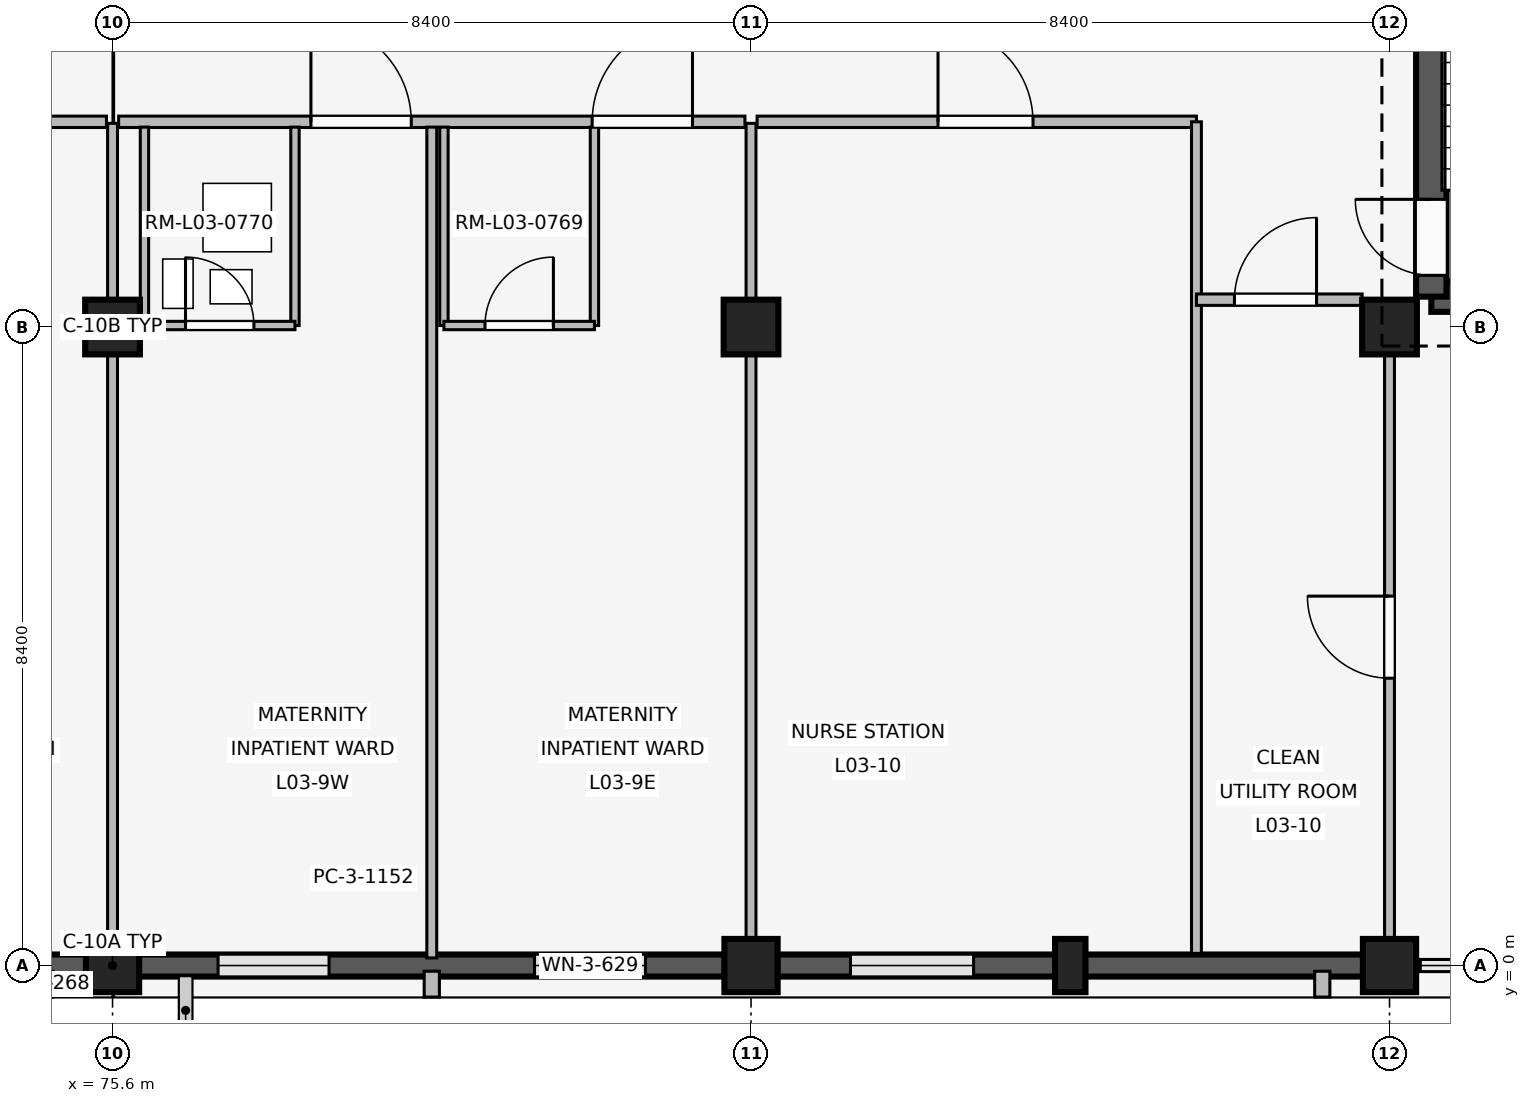
"""IFC4 building model, lengths in metres.
Left out: names, types, materials, properties, quantities, classifications, styles, units other than length and angle.
Written with IfcOpenShell. Run it as: python <this file> out.ifc"""

import sys

from ifc_helpers import new_model, si_unit, direction, frame, frame_2d, origin, origin_2d, place, context, subcontext, project, spatial, rectangle, extrude, element, fill, save


model = new_model("IFC4")
c1 = context("Model", 3, precision=1e-05, world=origin(), true_north=direction((0.0, 1.0)))
c2 = subcontext(c1, "Body", "Model", "MODEL_VIEW")
j1 = project(units=[si_unit("LENGTHUNIT", "METRE"), si_unit("PLANEANGLEUNIT", "RADIAN")], contexts=[c1])
p1 = place(None, origin())
s1 = spatial("IfcSite", under=j1, at=p1, CompositionType="ELEMENT")
p2 = place(p1, origin())
s2 = spatial("IfcBuilding", under=s1, at=p2, CompositionType="ELEMENT")
p3 = place(p2, frame((0.0, 0.0, 12.9)))
s3 = spatial("IfcBuildingStorey", under=s2, at=p3, CompositionType="ELEMENT", Elevation=12.9)
p4 = place(p3, frame((75.6, 0.0, 0.0), z_axis=(0.0, 0.0, 1.0), x_axis=(1.0, 0.0, 0.0)))
e1 = element("IfcColumn", 1, at=p4, inside=s3, PredefinedType="COLUMN", context=c2, shape_type="SweptSolid", body=[
    extrude(rectangle(XDim=0.7, YDim=0.7, at=origin_2d()), origin(), (0.0, 0.0, 1.0), 3.3),
])
p5 = place(p3, frame((75.6, 8.4, 0.0), z_axis=(0.0, 0.0, 1.0), x_axis=(1.0, 0.0, 0.0)))
e2 = element("IfcColumn", 2, at=p5, inside=s3, PredefinedType="COLUMN", context=c2, shape_type="SweptSolid", body=[
    extrude(rectangle(XDim=0.72, YDim=0.72, at=origin_2d()), origin(), (0.0, 0.0, 1.0), 3.3),
])
p6 = place(p3, frame((84.0, 0.0, 0.0), z_axis=(0.0, 0.0, 1.0), x_axis=(1.0, 0.0, 0.0)))
e3 = element("IfcColumn", 3, at=p6, inside=s3, PredefinedType="COLUMN", context=c2, shape_type="SweptSolid", body=[
    extrude(rectangle(XDim=0.7, YDim=0.7, at=origin_2d()), origin(), (0.0, 0.0, 1.0), 3.3),
])
p7 = place(p3, frame((84.0, 8.4, 0.0), z_axis=(0.0, 0.0, 1.0), x_axis=(1.0, 0.0, 0.0)))
e4 = element("IfcColumn", 4, at=p7, inside=s3, PredefinedType="COLUMN", context=c2, shape_type="SweptSolid", body=[
    extrude(rectangle(XDim=0.72, YDim=0.72, at=origin_2d()), origin(), (0.0, 0.0, 1.0), 3.3),
])
p8 = place(p3, frame((92.4, 0.0, 0.0), z_axis=(0.0, 0.0, 1.0), x_axis=(1.0, 0.0, 0.0)))
e5 = element("IfcColumn", 5, at=p8, inside=s3, PredefinedType="COLUMN", context=c2, shape_type="SweptSolid", body=[
    extrude(rectangle(XDim=0.7, YDim=0.7, at=origin_2d()), origin(), (0.0, 0.0, 1.0), 3.3),
])
p9 = place(p3, frame((92.4, 8.4, 0.0), z_axis=(0.0, 0.0, 1.0), x_axis=(1.0, 0.0, 0.0)))
e6 = element("IfcColumn", 6, at=p9, inside=s3, PredefinedType="COLUMN", context=c2, shape_type="SweptSolid", body=[
    extrude(rectangle(XDim=0.72, YDim=0.72, at=origin_2d()), origin(), (0.0, 0.0, 1.0), 3.3),
])
p10 = place(p3, frame((88.2, 0.0, 0.0), z_axis=(0.0, 0.0, 1.0), x_axis=(1.0, 0.0, 0.0)))
e7 = element("IfcColumn", 7, at=p10, inside=s3, PredefinedType="PILASTER", context=c2, shape_type="SweptSolid", body=[
    extrude(rectangle(XDim=0.4, YDim=0.7, at=origin_2d()), origin(), (0.0, 0.0, 1.0), 3.3),
])
p11 = place(p3, frame((75.255, 0.0, 0.0), z_axis=(0.0, 0.0, 1.0), x_axis=(-1.0, 0.0, 0.0)))
e8 = element("IfcWall", 8, at=p11, inside=s3, PredefinedType="SOLIDWALL", context=c2, shape_type="SweptSolid", body=[
    extrude(rectangle(XDim=7.71, YDim=0.29, at=frame_2d((3.855, 0.0))), origin(), (0.0, 0.0, 1.0), 2.44),
])
p12 = place(p11, frame((0.963, 0.0, 0.85)))
e9 = element("IfcOpeningElement", 9, at=p12, cuts=e8, PredefinedType="OPENING", context=c2, shape_type="SweptSolid", body=[
    extrude(rectangle(XDim=1.62, YDim=0.95, at=frame_2d((0.81, 0.475))), frame((0.0, 0.155, 0.0), z_axis=(0.0, -1.0, 0.0), x_axis=(1.0, 0.0, 0.0)), (0.0, 0.0, 1.0), 0.31),
])
p13 = place(p11, frame((5.127, 0.0, 0.85)))
e10 = element("IfcOpeningElement", 10, at=p13, cuts=e8, PredefinedType="OPENING", context=c2, shape_type="SweptSolid", body=[
    extrude(rectangle(XDim=1.62, YDim=0.95, at=frame_2d((0.81, 0.475))), frame((0.0, 0.155, 0.0), z_axis=(0.0, -1.0, 0.0), x_axis=(1.0, 0.0, 0.0)), (0.0, 0.0, 1.0), 0.31),
])
p14 = place(p3, frame((74.715, -0.075, 0.0), z_axis=(0.0, 0.0, 1.0), x_axis=(0.0, -1.0, 0.0)))
e11 = element("IfcWall", 11, at=p14, inside=s3, PredefinedType="ELEMENTEDWALL", context=c2, shape_type="SweptSolid", body=[
    extrude(rectangle(XDim=0.34, YDim=0.2, at=frame_2d((0.17, 0.0))), origin(), (0.0, 0.0, 1.0), 2.42),
])
p15 = place(p3, frame((83.655, 0.0, 0.0), z_axis=(0.0, 0.0, 1.0), x_axis=(-1.0, 0.0, 0.0)))
e12 = element("IfcWall", 12, at=p15, inside=s3, PredefinedType="SOLIDWALL", context=c2, shape_type="SweptSolid", body=[
    extrude(rectangle(XDim=7.71, YDim=0.29, at=frame_2d((3.855, 0.0))), origin(), (0.0, 0.0, 1.0), 2.44),
])
p16 = place(p15, frame((1.043, 0.0, 0.85)))
e13 = element("IfcOpeningElement", 13, at=p16, cuts=e12, PredefinedType="OPENING", context=c2, shape_type="SweptSolid", body=[
    extrude(rectangle(XDim=1.46, YDim=0.85, at=frame_2d((0.73, 0.425))), frame((0.0, 0.155, 0.0), z_axis=(0.0, -1.0, 0.0), x_axis=(1.0, 0.0, 0.0)), (0.0, 0.0, 1.0), 0.31),
])
p17 = place(p15, frame((5.207, 0.0, 0.85)))
e14 = element("IfcOpeningElement", 14, at=p17, cuts=e12, PredefinedType="OPENING", context=c2, shape_type="SweptSolid", body=[
    extrude(rectangle(XDim=1.46, YDim=0.85, at=frame_2d((0.73, 0.425))), frame((0.0, 0.155, 0.0), z_axis=(0.0, -1.0, 0.0), x_axis=(1.0, 0.0, 0.0)), (0.0, 0.0, 1.0), 0.31),
])
p18 = place(p3, frame((79.8, -0.075, 0.0), z_axis=(0.0, 0.0, 1.0), x_axis=(0.0, -1.0, 0.0)))
e15 = element("IfcWall", 15, at=p18, inside=s3, PredefinedType="ELEMENTEDWALL", context=c2, shape_type="SweptSolid", body=[
    extrude(rectangle(XDim=0.34, YDim=0.2, at=frame_2d((0.17, 0.0))), origin(), (0.0, 0.0, 1.0), 2.42),
])
p19 = place(p3, frame((92.055, 0.0, 0.0), z_axis=(0.0, 0.0, 1.0), x_axis=(-1.0, 0.0, 0.0)))
e16 = element("IfcWall", 16, at=p19, inside=s3, PredefinedType="SOLIDWALL", context=c2, shape_type="SweptSolid", body=[
    extrude(rectangle(XDim=7.71, YDim=0.29, at=frame_2d((3.855, 0.0))), origin(), (0.0, 0.0, 1.0), 2.44),
])
p20 = place(p19, frame((5.127, 0.0, 0.85)))
e17 = element("IfcOpeningElement", 17, at=p20, cuts=e16, PredefinedType="OPENING", context=c2, shape_type="SweptSolid", body=[
    extrude(rectangle(XDim=1.62, YDim=0.95, at=frame_2d((0.81, 0.475))), frame((0.0, 0.155, 0.0), z_axis=(0.0, -1.0, 0.0), x_axis=(1.0, 0.0, 0.0)), (0.0, 0.0, 1.0), 0.31),
])
p21 = place(p3, frame((91.515, -0.075, 0.0), z_axis=(0.0, 0.0, 1.0), x_axis=(0.0, -1.0, 0.0)))
e18 = element("IfcWall", 18, at=p21, inside=s3, PredefinedType="ELEMENTEDWALL", context=c2, shape_type="SweptSolid", body=[
    extrude(rectangle(XDim=0.34, YDim=0.2, at=frame_2d((0.17, 0.0))), origin(), (0.0, 0.0, 1.0), 2.42),
])
p22 = place(p3, frame((92.95, 8.8, 0.0), z_axis=(0.0, 0.0, 1.0), x_axis=(1.0, 0.0, 0.0)))
e19 = element("IfcWall", 19, at=p22, inside=s3, PredefinedType="SHEAR", context=c2, shape_type="SweptSolid", body=[
    extrude(rectangle(XDim=7.5, YDim=0.4, at=frame_2d((3.75, 0.0))), origin(), (0.0, 0.0, 1.0), 3.02),
])
p23 = place(p22, frame((4.85, 0.0, 0.0)))
e20 = element("IfcOpeningElement", 20, at=p23, cuts=e19, PredefinedType="OPENING", context=c2, shape_type="SweptSolid", body=[
    extrude(rectangle(XDim=1.2, YDim=2.2, at=frame_2d((0.6, 1.1))), frame((0.0, 0.21, 0.0), z_axis=(0.0, -1.0, 0.0), x_axis=(1.0, 0.0, 0.0)), (0.0, 0.0, 1.0), 0.42),
])
p24 = place(p3, frame((92.95, 8.8, 0.0), z_axis=(0.0, 0.0, 1.0), x_axis=(0.0, 1.0, 0.0)))
e21 = element("IfcWall", 21, at=p24, inside=s3, PredefinedType="SHEAR", context=c2, shape_type="SweptSolid", body=[
    extrude(rectangle(XDim=7.55, YDim=0.4, at=frame_2d((3.775, 0.0))), origin(), (0.0, 0.0, 1.0), 3.02),
])
p25 = place(p24, frame((0.28, 0.0, 0.0)))
e22 = element("IfcOpeningElement", 22, at=p25, cuts=e21, PredefinedType="OPENING", context=c2, shape_type="SweptSolid", body=[
    extrude(rectangle(XDim=1.0, YDim=2.15, at=frame_2d((0.5, 1.075))), frame((0.0, 0.21, 0.0), z_axis=(0.0, -1.0, 0.0), x_axis=(1.0, 0.0, 0.0)), (0.0, 0.0, 1.0), 0.42),
])
p26 = place(p3, frame((67.28, 11.1, 0.0), z_axis=(0.0, 0.0, 1.0), x_axis=(1.0, 0.0, 0.0)))
e23 = element("IfcWall", 23, at=p26, inside=s3, PredefinedType="PARTITIONING", context=c2, shape_type="SweptSolid", body=[
    extrude(rectangle(XDim=8.24, YDim=0.15, at=frame_2d((4.12, 0.0))), origin(), (0.0, 0.0, 1.0), 2.42),
])
p27 = place(p26, frame((2.53, 0.0, 0.0)))
e24 = element("IfcOpeningElement", 24, at=p27, cuts=e23, PredefinedType="OPENING", context=c2, shape_type="SweptSolid", body=[
    extrude(rectangle(XDim=1.25, YDim=2.2, at=frame_2d((0.625, 1.1))), frame((0.0, 0.085, 0.0), z_axis=(0.0, -1.0, 0.0), x_axis=(1.0, 0.0, 0.0)), (0.0, 0.0, 1.0), 0.17),
])
p28 = place(p26, frame((6.23, 0.0, 0.0)))
e25 = element("IfcOpeningElement", 25, at=p28, cuts=e23, PredefinedType="OPENING", context=c2, shape_type="SweptSolid", body=[
    extrude(rectangle(XDim=1.25, YDim=2.2, at=frame_2d((0.625, 1.1))), frame((0.0, 0.085, 0.0), z_axis=(0.0, -1.0, 0.0), x_axis=(1.0, 0.0, 0.0)), (0.0, 0.0, 1.0), 0.17),
])
p29 = place(p3, frame((75.6, 0.14, 0.0), z_axis=(0.0, 0.0, 1.0), x_axis=(0.0, 1.0, 0.0)))
e26 = element("IfcWall", 26, at=p29, inside=s3, PredefinedType="PARTITIONING", context=c2, shape_type="SweptSolid", body=[
    extrude(rectangle(XDim=10.94, YDim=0.13, at=frame_2d((5.47, 0.0))), origin(), (0.0, 0.0, 1.0), 2.42),
])
p30 = place(p3, frame((75.68, 11.1, 0.0), z_axis=(0.0, 0.0, 1.0), x_axis=(1.0, 0.0, 0.0)))
e27 = element("IfcWall", 27, at=p30, inside=s3, PredefinedType="PARTITIONING", context=c2, shape_type="SweptSolid", body=[
    extrude(rectangle(XDim=8.24, YDim=0.15, at=frame_2d((4.12, 0.0))), origin(), (0.0, 0.0, 1.0), 2.42),
])
p31 = place(p30, frame((2.53, 0.0, 0.0)))
e28 = element("IfcOpeningElement", 28, at=p31, cuts=e27, PredefinedType="OPENING", context=c2, shape_type="SweptSolid", body=[
    extrude(rectangle(XDim=1.32, YDim=2.25, at=frame_2d((0.66, 1.125))), frame((0.0, 0.085, 0.0), z_axis=(0.0, -1.0, 0.0), x_axis=(1.0, 0.0, 0.0)), (0.0, 0.0, 1.0), 0.17),
])
p32 = place(p30, frame((6.23, 0.0, 0.0)))
e29 = element("IfcOpeningElement", 29, at=p32, cuts=e27, PredefinedType="OPENING", context=c2, shape_type="SweptSolid", body=[
    extrude(rectangle(XDim=1.32, YDim=2.25, at=frame_2d((0.66, 1.125))), frame((0.0, 0.085, 0.0), z_axis=(0.0, -1.0, 0.0), x_axis=(1.0, 0.0, 0.0)), (0.0, 0.0, 1.0), 0.17),
])
p33 = place(p3, frame((79.8, 0.1, 0.0), z_axis=(0.0, 0.0, 1.0), x_axis=(0.0, 1.0, 0.0)))
e30 = element("IfcWall", 30, at=p33, inside=s3, PredefinedType="PARTITIONING", context=c2, shape_type="SweptSolid", body=[
    extrude(rectangle(XDim=10.93, YDim=0.13, at=frame_2d((5.465, 0.0))), origin(), (0.0, 0.0, 1.0), 2.42),
])
for number, where, z_axis, x_axis in (
    (31, (76.02, 8.42, 0.0), (0.0, 0.0, 1.0), (0.0, 1.0, 0.0)),
    (32, (78.0, 8.42, 0.0), (0.0, 0.0, 1.0), (0.0, 1.0, 0.0)),
):
    element("IfcWall", number, at=place(p3, frame(where, z_axis=z_axis, x_axis=x_axis)), inside=s3, PredefinedType="PARTITIONING", context=c2, shape_type="SweptSolid", body=[
        extrude(rectangle(XDim=2.61, YDim=0.11, at=frame_2d((1.305, 0.0))), origin(), (0.0, 0.0, 1.0), 2.42),
    ])
p34 = place(p3, frame((76.02, 8.42, 0.0), z_axis=(0.0, 0.0, 1.0), x_axis=(1.0, 0.0, 0.0)))
e33 = element("IfcWall", 33, at=p34, inside=s3, PredefinedType="PARTITIONING", context=c2, shape_type="SweptSolid", body=[
    extrude(rectangle(XDim=1.98, YDim=0.11, at=frame_2d((0.99, 0.0))), origin(), (0.0, 0.0, 1.0), 2.42),
])
p35 = place(p34, frame((0.54, 0.0, 0.0)))
e34 = element("IfcOpeningElement", 34, at=p35, cuts=e33, PredefinedType="OPENING", context=c2, shape_type="SweptSolid", body=[
    extrude(rectangle(XDim=0.9, YDim=2.1, at=frame_2d((0.45, 1.05))), frame((0.0, 0.065, 0.0), z_axis=(0.0, -1.0, 0.0), x_axis=(1.0, 0.0, 0.0)), (0.0, 0.0, 1.0), 0.13),
])
for number, where, z_axis, x_axis in (
    (35, (79.96, 8.42, 0.0), (0.0, 0.0, 1.0), (0.0, 1.0, 0.0)),
    (36, (81.94, 8.42, 0.0), (0.0, 0.0, 1.0), (0.0, 1.0, 0.0)),
):
    element("IfcWall", number, at=place(p3, frame(where, z_axis=z_axis, x_axis=x_axis)), inside=s3, PredefinedType="PARTITIONING", context=c2, shape_type="SweptSolid", body=[
        extrude(rectangle(XDim=2.61, YDim=0.11, at=frame_2d((1.305, 0.0))), origin(), (0.0, 0.0, 1.0), 2.42),
    ])
p36 = place(p3, frame((79.96, 8.42, 0.0), z_axis=(0.0, 0.0, 1.0), x_axis=(1.0, 0.0, 0.0)))
e37 = element("IfcWall", 37, at=p36, inside=s3, PredefinedType="PARTITIONING", context=c2, shape_type="SweptSolid", body=[
    extrude(rectangle(XDim=1.98, YDim=0.11, at=frame_2d((0.99, 0.0))), origin(), (0.0, 0.0, 1.0), 2.42),
])
p37 = place(p36, frame((0.54, 0.0, 0.0)))
e38 = element("IfcOpeningElement", 38, at=p37, cuts=e37, PredefinedType="OPENING", context=c2, shape_type="SweptSolid", body=[
    extrude(rectangle(XDim=0.9, YDim=2.1, at=frame_2d((0.45, 1.05))), frame((0.0, 0.065, 0.0), z_axis=(0.0, -1.0, 0.0), x_axis=(1.0, 0.0, 0.0)), (0.0, 0.0, 1.0), 0.13),
])
p38 = place(p3, frame((78.45, 1.15, 0.0), z_axis=(0.0, 0.0, 1.0), x_axis=(1.0, 0.0, 0.0)))
e39 = element("IfcWall", 39, at=p38, inside=s3, PredefinedType="PLUMBINGWALL", context=c2, shape_type="SweptSolid", body=[
    extrude(rectangle(XDim=0.9, YDim=0.24, at=frame_2d((0.45, 0.0))), origin(), (0.0, 0.0, 1.0), 2.42),
])
p39 = place(p3, frame((84.0, 0.14, 0.0), z_axis=(0.0, 0.0, 1.0), x_axis=(0.0, 1.0, 0.0)))
e40 = element("IfcWall", 40, at=p39, inside=s3, PredefinedType="PARTITIONING", context=c2, shape_type="SweptSolid", body=[
    extrude(rectangle(XDim=10.94, YDim=0.13, at=frame_2d((5.47, 0.0))), origin(), (0.0, 0.0, 1.0), 2.42),
])
p40 = place(p3, frame((84.08, 11.1, 0.0), z_axis=(0.0, 0.0, 1.0), x_axis=(1.0, 0.0, 0.0)))
e41 = element("IfcWall", 41, at=p40, inside=s3, PredefinedType="PARTITIONING", context=c2, shape_type="SweptSolid", body=[
    extrude(rectangle(XDim=5.78, YDim=0.15, at=frame_2d((2.89, 0.0))), origin(), (0.0, 0.0, 1.0), 2.42),
])
p41 = place(p40, frame((2.38, 0.0, 0.0)))
e42 = element("IfcOpeningElement", 42, at=p41, cuts=e41, PredefinedType="OPENING", context=c2, shape_type="SweptSolid", body=[
    extrude(rectangle(XDim=1.25, YDim=2.2, at=frame_2d((0.625, 1.1))), frame((0.0, 0.085, 0.0), z_axis=(0.0, -1.0, 0.0), x_axis=(1.0, 0.0, 0.0)), (0.0, 0.0, 1.0), 0.17),
])
p42 = place(p3, frame((89.86, 0.16, 0.0), z_axis=(0.0, 0.0, 1.0), x_axis=(0.0, 1.0, 0.0)))
e43 = element("IfcWall", 43, at=p42, inside=s3, PredefinedType="PARTITIONING", context=c2, shape_type="SweptSolid", body=[
    extrude(rectangle(XDim=10.94, YDim=0.13, at=frame_2d((5.47, 0.0))), origin(), (0.0, 0.0, 1.0), 2.42),
])
p43 = place(p3, frame((89.86, 8.76, 0.0), z_axis=(0.0, 0.0, 1.0), x_axis=(1.0, 0.0, 0.0)))
e44 = element("IfcWall", 44, at=p43, inside=s3, PredefinedType="PARTITIONING", context=c2, shape_type="SweptSolid", body=[
    extrude(rectangle(XDim=2.18, YDim=0.15, at=frame_2d((1.09, 0.0))), origin(), (0.0, 0.0, 1.0), 2.42),
])
p44 = place(p43, frame((0.5, 0.0, 0.0)))
e45 = element("IfcOpeningElement", 45, at=p44, cuts=e44, PredefinedType="OPENING", context=c2, shape_type="SweptSolid", body=[
    extrude(rectangle(XDim=1.08, YDim=2.15, at=frame_2d((0.54, 1.075))), frame((0.0, 0.085, 0.0), z_axis=(0.0, -1.0, 0.0), x_axis=(1.0, 0.0, 0.0)), (0.0, 0.0, 1.0), 0.17),
])
p45 = place(p3, frame((92.4, 0.14, 0.0), z_axis=(0.0, 0.0, 1.0), x_axis=(0.0, 1.0, 0.0)))
e46 = element("IfcWall", 46, at=p45, inside=s3, PredefinedType="PARTITIONING", context=c2, shape_type="SweptSolid", body=[
    extrude(rectangle(XDim=8.21, YDim=0.13, at=frame_2d((4.105, 0.0))), origin(), (0.0, 0.0, 1.0), 2.42),
])
p46 = place(p45, frame((3.64, 0.0, 0.0)))
e47 = element("IfcOpeningElement", 47, at=p46, cuts=e46, PredefinedType="OPENING", context=c2, shape_type="SweptSolid", body=[
    extrude(rectangle(XDim=1.08, YDim=2.15, at=frame_2d((0.54, 1.075))), frame((0.0, 0.075, 0.0), z_axis=(0.0, -1.0, 0.0), x_axis=(1.0, 0.0, 0.0)), (0.0, 0.0, 1.0), 0.15),
])
p47 = place(p16, origin())
e48 = element("IfcWindow", 48, at=p47, inside=s3, PartitioningType="SINGLE_PANEL", PredefinedType="WINDOW", context=c2, shape_type="SweptSolid", body=[
    extrude(rectangle(XDim=1.46, YDim=0.85, at=frame_2d((0.73, 0.425))), frame((0.0, 0.03, 0.0), z_axis=(0.0, -1.0, 0.0), x_axis=(1.0, 0.0, 0.0)), (0.0, 0.0, 1.0), 0.06),
])
fill(e13, e48)
p48 = place(p17, origin())
e49 = element("IfcWindow", 49, at=p48, inside=s3, PartitioningType="SINGLE_PANEL", PredefinedType="WINDOW", context=c2, shape_type="SweptSolid", body=[
    extrude(rectangle(XDim=1.46, YDim=0.85, at=frame_2d((0.73, 0.425))), frame((0.0, 0.03, 0.0), z_axis=(0.0, -1.0, 0.0), x_axis=(1.0, 0.0, 0.0)), (0.0, 0.0, 1.0), 0.06),
])
fill(e14, e49)
p49 = place(p20, origin())
e50 = element("IfcWindow", 50, at=p49, inside=s3, PartitioningType="SINGLE_PANEL", PredefinedType="WINDOW", context=c2, shape_type="SweptSolid", body=[
    extrude(rectangle(XDim=1.62, YDim=0.95, at=frame_2d((0.81, 0.475))), frame((0.0, 0.03, 0.0), z_axis=(0.0, -1.0, 0.0), x_axis=(1.0, 0.0, 0.0)), (0.0, 0.0, 1.0), 0.06),
])
fill(e17, e50)
p50 = place(p25, origin())
e51 = element("IfcDoor", 51, at=p50, inside=s3, OperationType="SINGLE_SWING_RIGHT", PredefinedType="DOOR", context=c2, shape_type="SweptSolid", body=[
    extrude(rectangle(XDim=1.0, YDim=2.15, at=frame_2d((0.5, 1.075))), frame((0.0, 0.025, 0.0), z_axis=(0.0, -1.0, 0.0), x_axis=(1.0, 0.0, 0.0)), (0.0, 0.0, 1.0), 0.05),
])
fill(e22, e51)
p51 = place(p31, origin())
e52 = element("IfcDoor", 52, at=p51, inside=s3, OperationType="SINGLE_SWING_LEFT", PredefinedType="DOOR", context=c2, shape_type="SweptSolid", body=[
    extrude(rectangle(XDim=1.32, YDim=2.25, at=frame_2d((0.66, 1.125))), frame((0.0, 0.025, 0.0), z_axis=(0.0, -1.0, 0.0), x_axis=(1.0, 0.0, 0.0)), (0.0, 0.0, 1.0), 0.05),
])
fill(e28, e52)
p52 = place(p32, origin())
e53 = element("IfcDoor", 53, at=p52, inside=s3, OperationType="SINGLE_SWING_RIGHT", PredefinedType="DOOR", context=c2, shape_type="SweptSolid", body=[
    extrude(rectangle(XDim=1.32, YDim=2.25, at=frame_2d((0.66, 1.125))), frame((0.0, 0.025, 0.0), z_axis=(0.0, -1.0, 0.0), x_axis=(1.0, 0.0, 0.0)), (0.0, 0.0, 1.0), 0.05),
])
fill(e29, e53)
p53 = place(p35, origin())
e54 = element("IfcDoor", 54, at=p53, inside=s3, OperationType="SINGLE_SWING_LEFT", PredefinedType="DOOR", context=c2, shape_type="SweptSolid", body=[
    extrude(rectangle(XDim=0.9, YDim=2.1, at=frame_2d((0.45, 1.05))), frame((0.0, 0.025, 0.0), z_axis=(0.0, -1.0, 0.0), x_axis=(1.0, 0.0, 0.0)), (0.0, 0.0, 1.0), 0.05),
])
fill(e34, e54)
p54 = place(p37, origin())
e55 = element("IfcDoor", 55, at=p54, inside=s3, OperationType="SINGLE_SWING_RIGHT", PredefinedType="DOOR", context=c2, shape_type="SweptSolid", body=[
    extrude(rectangle(XDim=0.9, YDim=2.1, at=frame_2d((0.45, 1.05))), frame((0.0, 0.025, 0.0), z_axis=(0.0, -1.0, 0.0), x_axis=(1.0, 0.0, 0.0)), (0.0, 0.0, 1.0), 0.05),
])
fill(e38, e55)
p55 = place(p41, origin())
e56 = element("IfcDoor", 56, at=p55, inside=s3, OperationType="SINGLE_SWING_LEFT", PredefinedType="DOOR", context=c2, shape_type="SweptSolid", body=[
    extrude(rectangle(XDim=1.25, YDim=2.2, at=frame_2d((0.625, 1.1))), frame((0.0, 0.025, 0.0), z_axis=(0.0, -1.0, 0.0), x_axis=(1.0, 0.0, 0.0)), (0.0, 0.0, 1.0), 0.05),
])
fill(e42, e56)
p56 = place(p44, origin())
e57 = element("IfcDoor", 57, at=p56, inside=s3, OperationType="SINGLE_SWING_RIGHT", PredefinedType="DOOR", context=c2, shape_type="SweptSolid", body=[
    extrude(rectangle(XDim=1.08, YDim=2.15, at=frame_2d((0.54, 1.075))), frame((0.0, 0.025, 0.0), z_axis=(0.0, -1.0, 0.0), x_axis=(1.0, 0.0, 0.0)), (0.0, 0.0, 1.0), 0.05),
])
fill(e45, e57)
p57 = place(p46, origin())
e58 = element("IfcDoor", 58, at=p57, inside=s3, OperationType="SINGLE_SWING_RIGHT", PredefinedType="DOOR", context=c2, shape_type="SweptSolid", body=[
    extrude(rectangle(XDim=1.08, YDim=2.15, at=frame_2d((0.54, 1.075))), frame((0.0, 0.025, 0.0), z_axis=(0.0, -1.0, 0.0), x_axis=(1.0, 0.0, 0.0)), (0.0, 0.0, 1.0), 0.05),
])
fill(e47, e58)
save(model, sys.argv[1])
